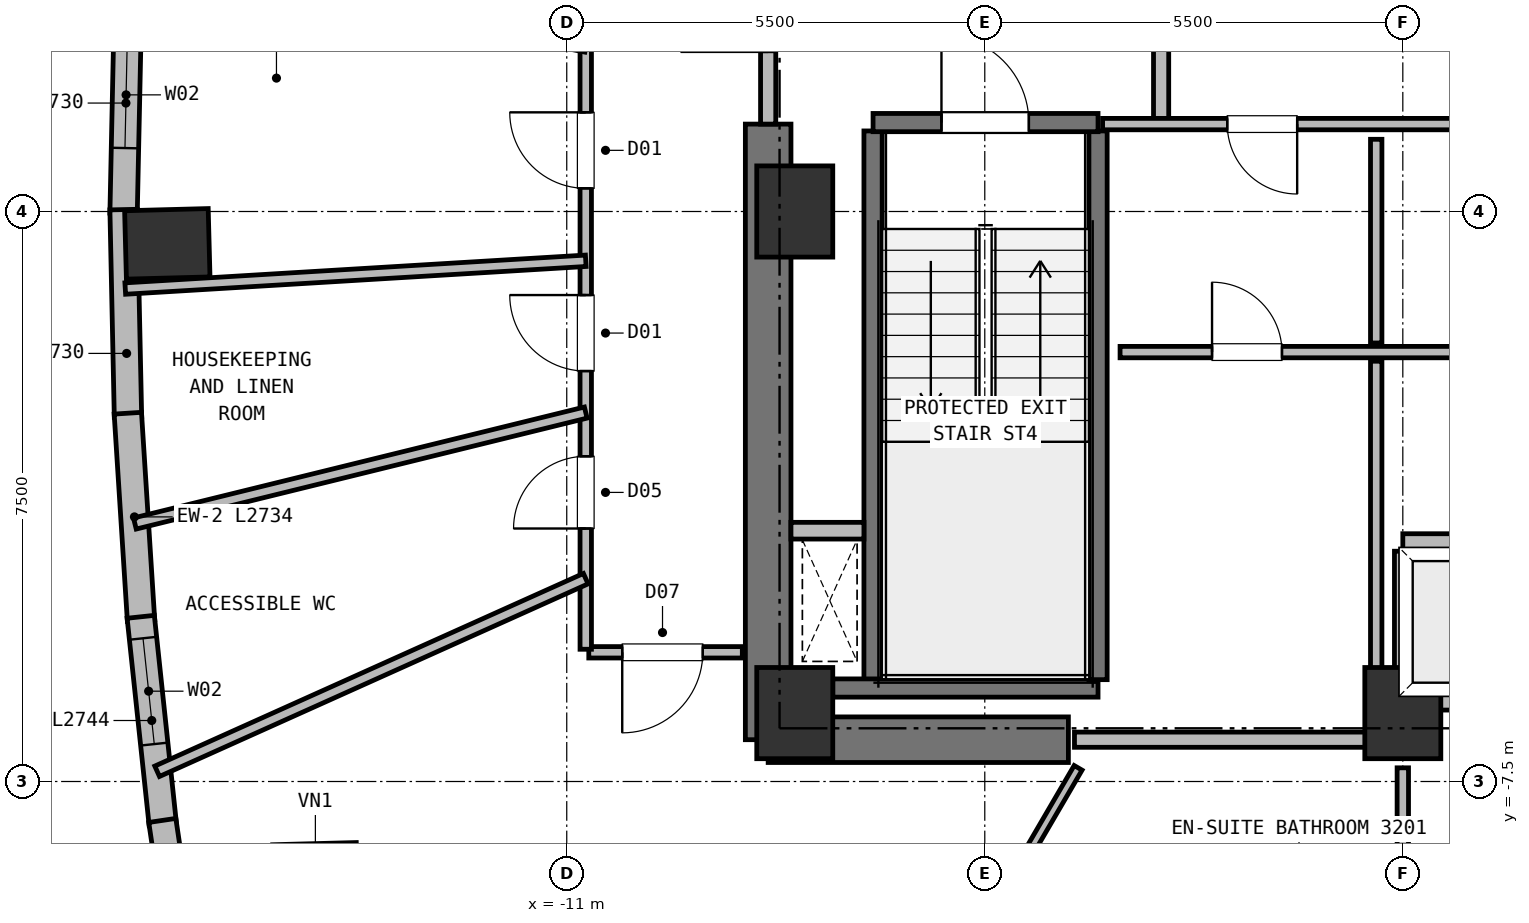
"""IFC4 building model, lengths in metres.
Left out: names, types, materials, properties, quantities, classifications, styles, units other than length and angle.
Written with IfcOpenShell. Run it as: python <this file> out.ifc"""

import sys

from ifc_helpers import new_model, si_unit, direction, frame, frame_2d, origin, origin_2d, place, context, subcontext, project, spatial, rectangle, extrude, element, fill, save


model = new_model("IFC4")
c1 = context("Model", 3, precision=1e-05, world=origin(), true_north=direction((0.0, 1.0)))
c2 = subcontext(c1, "Body", "Model", "MODEL_VIEW")
j1 = project(units=[si_unit("LENGTHUNIT", "METRE"), si_unit("PLANEANGLEUNIT", "RADIAN")], contexts=[c1])
p1 = place(None, origin())
s1 = spatial("IfcSite", under=j1, at=p1, CompositionType="ELEMENT")
p2 = place(p1, origin())
s2 = spatial("IfcBuilding", under=s1, at=p2, CompositionType="ELEMENT")
p3 = place(p2, frame((0.0, 0.0, 119.75)))
s3 = spatial("IfcBuildingStorey", under=s2, at=p3, CompositionType="ELEMENT", Elevation=119.75)
for number, where, z_axis, x_axis in (
    (1, (-8.0, -6.6, 0.0), (0.0, 0.0, 1.0), (1.0, 0.0, 0.0)),
    (2, (0.0, -6.6, 0.0), (0.0, 0.0, 1.0), (1.0, 0.0, 0.0)),
    (3, (-8.0, 0.0, 0.0), (0.0, 0.0, 1.0), (1.0, 0.0, 0.0)),
):
    element("IfcColumn", number, at=place(p3, frame(where, z_axis=z_axis, x_axis=x_axis)), inside=s3, PredefinedType="COLUMN", context=c2, shape_type="SweptSolid", body=[
        extrude(rectangle(XDim=1.0, YDim=1.2, at=origin_2d()), origin(), (0.0, 0.0, 1.0), 3.75),
    ])
p4 = place(p3, frame((-8.35, -6.95, 0.0), z_axis=(0.0, 0.0, 1.0), x_axis=(1.0, 0.0, 0.0)))
e4 = element("IfcWall", 4, at=p4, inside=s3, PredefinedType="SHEAR", context=c2, shape_type="SweptSolid", body=[
    extrude(rectangle(XDim=3.95, YDim=0.6, at=frame_2d((1.975, 0.0))), origin(), (0.0, 0.0, 1.0), 3.5),
])
p5 = place(p3, frame((-8.35, -6.95, 0.0), z_axis=(0.0, 0.0, 1.0), x_axis=(0.0, 1.0, 0.0)))
e5 = element("IfcWall", 5, at=p5, inside=s3, PredefinedType="SHEAR", context=c2, shape_type="SweptSolid", body=[
    extrude(rectangle(XDim=8.1, YDim=0.6, at=frame_2d((4.05, 0.0))), origin(), (0.0, 0.0, 1.0), 3.5),
])
for number, where, z_axis, x_axis in (
    (6, (-16.255, -0.426, 0.0), (0.0, 0.0, 1.0), (-0.026, 1.0, 0.0)),
    (7, (-14.307, -8.768, 0.0), (0.0, 0.0, 1.0), (-0.026, 1.0, 0.0)),
):
    element("IfcColumn", number, at=place(p3, frame(where, z_axis=z_axis, x_axis=x_axis)), inside=s3, PredefinedType="COLUMN", context=c2, shape_type="SweptSolid", body=[
        extrude(rectangle(XDim=0.9, YDim=1.1, at=origin_2d()), origin(), (0.0, 0.0, 1.0), 3.75),
    ])
p6 = place(p3, frame((-16.831, -0.025, 0.0), z_axis=(0.0, 0.0, 1.0), x_axis=(0.021286998628, 0.999773406172, 0.0)))
e8 = element("IfcWall", 8, at=p6, inside=s3, PredefinedType="SOLIDWALL", context=c2, shape_type="SweptSolid", body=[
    extrude(rectangle(XDim=2.73, YDim=0.36, at=frame_2d((1.365, 0.0))), origin(), (0.0, 0.0, 1.0), 3.5),
])
p7 = place(p6, frame((0.86, 0.0, 0.72)))
e9 = element("IfcOpeningElement", 9, at=p7, cuts=e8, PredefinedType="OPENING", context=c2, shape_type="SweptSolid", body=[
    extrude(rectangle(XDim=1.4, YDim=1.84, at=frame_2d((0.7, 0.92))), frame((0.0, 0.19, 0.0), z_axis=(0.0, -1.0, 0.0), x_axis=(1.0, 0.0, 0.0)), (0.0, 0.0, 1.0), 0.38),
])
p8 = place(p3, frame((-16.773, -2.704, 0.0), z_axis=(0.0, 0.0, 1.0), x_axis=(-0.021286998628, 0.999773406172, 0.0)))
e10 = element("IfcWall", 10, at=p8, inside=s3, PredefinedType="SOLIDWALL", context=c2, shape_type="SweptSolid", body=[
    extrude(rectangle(XDim=2.73, YDim=0.36, at=frame_2d((1.365, 0.0))), origin(), (0.0, 0.0, 1.0), 3.5),
])
p9 = place(p3, frame((-16.601, -5.383, 0.0), z_axis=(0.0, 0.0, 1.0), x_axis=(-0.063662313476, 0.99797149751, 0.0)))
e11 = element("IfcWall", 11, at=p9, inside=s3, PredefinedType="SOLIDWALL", context=c2, shape_type="SweptSolid", body=[
    extrude(rectangle(XDim=2.734, YDim=0.36, at=frame_2d((1.367, 0.0))), origin(), (0.0, 0.0, 1.0), 3.5),
])
p10 = place(p3, frame((-16.315, -8.062, 0.0), z_axis=(0.0, 0.0, 1.0), x_axis=(-0.105606362296, 0.994408012962, 0.0)))
e12 = element("IfcWall", 12, at=p10, inside=s3, PredefinedType="SOLIDWALL", context=c2, shape_type="SweptSolid", body=[
    extrude(rectangle(XDim=2.744, YDim=0.36, at=frame_2d((1.372, 0.0))), origin(), (0.0, 0.0, 1.0), 3.5),
])
p11 = place(p10, frame((1.06, 0.0, 0.72)))
e13 = element("IfcOpeningElement", 13, at=p11, cuts=e12, PredefinedType="OPENING", context=c2, shape_type="SweptSolid", body=[
    extrude(rectangle(XDim=1.4, YDim=1.84, at=frame_2d((0.7, 0.92))), frame((0.0, 0.19, 0.0), z_axis=(0.0, -1.0, 0.0), x_axis=(1.0, 0.0, 0.0)), (0.0, 0.0, 1.0), 0.38),
])
p12 = place(p3, frame((-15.915, -10.74, 0.0), z_axis=(0.0, 0.0, 1.0), x_axis=(-0.147193392227, 0.98910773189, 0.0)))
e14 = element("IfcWall", 14, at=p12, inside=s3, PredefinedType="SOLIDWALL", context=c2, shape_type="SweptSolid", body=[
    extrude(rectangle(XDim=2.758, YDim=0.36, at=frame_2d((1.379, 0.0))), origin(), (0.0, 0.0, 1.0), 3.5),
])
p13 = place(p12, frame((0.579, 0.0, 0.72)))
e15 = element("IfcOpeningElement", 15, at=p13, cuts=e14, PredefinedType="OPENING", context=c2, shape_type="SweptSolid", body=[
    extrude(rectangle(XDim=1.6, YDim=1.88, at=frame_2d((0.8, 0.94))), frame((0.0, 0.19, 0.0), z_axis=(0.0, -1.0, 0.0), x_axis=(1.0, 0.0, 0.0)), (0.0, 0.0, 1.0), 0.38),
])
p14 = place(p3, frame((-6.97, -6.16, 0.0), z_axis=(0.0, 0.0, 1.0), x_axis=(0.0, 1.0, 0.0)))
e16 = element("IfcWall", 16, at=p14, inside=s3, PredefinedType="SHEAR", context=c2, shape_type="SweptSolid", body=[
    extrude(rectangle(XDim=7.22, YDim=0.24, at=frame_2d((3.61, 0.0))), origin(), (0.0, 0.0, 1.0), 3.5),
])
p15 = place(p3, frame((-7.5, -6.27, 0.0), z_axis=(0.0, 0.0, 1.0), x_axis=(1.0, 0.0, 0.0)))
e17 = element("IfcWall", 17, at=p15, inside=s3, PredefinedType="SHEAR", context=c2, shape_type="SweptSolid", body=[
    extrude(rectangle(XDim=3.49, YDim=0.24, at=frame_2d((1.745, 0.0))), origin(), (0.0, 0.0, 1.0), 3.5),
])
p16 = place(p3, frame((-4.01, -6.16, 0.0), z_axis=(0.0, 0.0, 1.0), x_axis=(0.0, 1.0, 0.0)))
e18 = element("IfcWall", 18, at=p16, inside=s3, PredefinedType="SHEAR", context=c2, shape_type="SweptSolid", body=[
    extrude(rectangle(XDim=7.22, YDim=0.24, at=frame_2d((3.61, 0.0))), origin(), (0.0, 0.0, 1.0), 3.5),
])
p17 = place(p3, frame((-6.97, 1.17, 0.0), z_axis=(0.0, 0.0, 1.0), x_axis=(1.0, 0.0, 0.0)))
e19 = element("IfcWall", 19, at=p17, inside=s3, PredefinedType="SHEAR", context=c2, shape_type="SweptSolid", body=[
    extrude(rectangle(XDim=2.96, YDim=0.24, at=frame_2d((1.48, 0.0))), origin(), (0.0, 0.0, 1.0), 3.5),
])
p18 = place(p17, frame((0.9, 0.0, 0.0)))
e20 = element("IfcOpeningElement", 20, at=p18, cuts=e19, PredefinedType="OPENING", context=c2, shape_type="SweptSolid", body=[
    extrude(rectangle(XDim=1.15, YDim=2.15, at=frame_2d((0.575, 1.075))), frame((0.0, 0.13, 0.0), z_axis=(0.0, -1.0, 0.0), x_axis=(1.0, 0.0, 0.0)), (0.0, 0.0, 1.0), 0.26),
])
p19 = place(p3, frame((-8.05, -4.2, 0.0), z_axis=(0.0, 0.0, 1.0), x_axis=(1.0, 0.0, 0.0)))
e21 = element("IfcWall", 21, at=p19, inside=s3, PredefinedType="PARTITIONING", context=c2, shape_type="SweptSolid", body=[
    extrude(rectangle(XDim=0.96, YDim=0.22, at=frame_2d((0.48, 0.0))), origin(), (0.0, 0.0, 1.0), 3.5),
])
p20 = place(p3, frame((0.0, -6.45, 0.0), z_axis=(0.0, 0.0, 1.0), x_axis=(1.0, 0.0, 0.0)))
e22 = element("IfcWall", 22, at=p20, inside=s3, PredefinedType="PARTITIONING", context=c2, shape_type="SweptSolid", body=[
    extrude(rectangle(XDim=1.86, YDim=0.22, at=frame_2d((0.93, 0.0))), origin(), (0.0, 0.0, 1.0), 3.12),
])
p21 = place(p20, frame((0.64, 0.0, 0.0)))
e23 = element("IfcOpeningElement", 23, at=p21, cuts=e22, PredefinedType="OPENING", context=c2, shape_type="SweptSolid", body=[
    extrude(rectangle(XDim=1.08, YDim=2.15, at=frame_2d((0.54, 1.075))), frame((0.0, 0.12, 0.0), z_axis=(0.0, -1.0, 0.0), x_axis=(1.0, 0.0, 0.0)), (0.0, 0.0, 1.0), 0.24),
])
for number, where, z_axis, x_axis in (
    (24, (0.0, -4.35, 0.0), (0.0, 0.0, 1.0), (1.0, 0.0, 0.0)),
    (25, (0.0, -6.33, 0.0), (0.0, 0.0, 1.0), (0.0, 1.0, 0.0)),
):
    element("IfcWall", number, at=place(p3, frame(where, z_axis=z_axis, x_axis=x_axis)), inside=s3, PredefinedType="PARTITIONING", context=c2, shape_type="SweptSolid", body=[
        extrude(rectangle(XDim=1.86, YDim=0.22, at=frame_2d((0.93, 0.0))), origin(), (0.0, 0.0, 1.0), 3.5),
    ])
p22 = place(p3, frame((-3.18, 1.15, 0.0), z_axis=(0.0, 0.0, 1.0), x_axis=(0.0, 1.0, 0.0)))
e26 = element("IfcWall", 26, at=p22, inside=s3, PredefinedType="PARTITIONING", context=c2, shape_type="SweptSolid", body=[
    extrude(rectangle(XDim=3.3, YDim=0.2, at=frame_2d((1.65, 0.0))), origin(), (0.0, 0.0, 1.0), 3.5),
])
p23 = place(p22, frame((1.08, 0.0, 0.0)))
e27 = element("IfcOpeningElement", 27, at=p23, cuts=e26, PredefinedType="OPENING", context=c2, shape_type="SweptSolid", body=[
    extrude(rectangle(XDim=1.15, YDim=2.15, at=frame_2d((0.575, 1.075))), frame((0.0, 0.11, 0.0), z_axis=(0.0, -1.0, 0.0), x_axis=(1.0, 0.0, 0.0)), (0.0, 0.0, 1.0), 0.22),
])
p24 = place(p3, frame((-8.35, 1.15, 0.0), z_axis=(0.0, 0.0, 1.0), x_axis=(0.0, 1.0, 0.0)))
e28 = element("IfcWall", 28, at=p24, inside=s3, PredefinedType="PARTITIONING", context=c2, shape_type="SweptSolid", body=[
    extrude(rectangle(XDim=5.4, YDim=0.2, at=frame_2d((2.7, 0.0))), origin(), (0.0, 0.0, 1.0), 3.5),
])
p25 = place(p24, frame((0.95, 0.0, 0.0)))
e29 = element("IfcOpeningElement", 29, at=p25, cuts=e28, PredefinedType="OPENING", context=c2, shape_type="SweptSolid", body=[
    extrude(rectangle(XDim=1.15, YDim=2.15, at=frame_2d((0.575, 1.075))), frame((0.0, 0.11, 0.0), z_axis=(0.0, -1.0, 0.0), x_axis=(1.0, 0.0, 0.0)), (0.0, 0.0, 1.0), 0.22),
])
p26 = place(p3, frame((3.95, 1.15, 0.0), z_axis=(0.0, 0.0, 1.0), x_axis=(-1.0, 0.0, 0.0)))
e30 = element("IfcWall", 30, at=p26, inside=s3, PredefinedType="PARTITIONING", context=c2, shape_type="SweptSolid", body=[
    extrude(rectangle(XDim=7.9, YDim=0.15, at=frame_2d((3.95, 0.0))), origin(), (0.0, 0.0, 1.0), 3.5),
])
p27 = place(p26, frame((5.34, 0.0, 0.0)))
e31 = element("IfcOpeningElement", 31, at=p27, cuts=e30, PredefinedType="OPENING", context=c2, shape_type="SweptSolid", body=[
    extrude(rectangle(XDim=0.92, YDim=2.05, at=frame_2d((0.46, 1.025))), frame((0.0, 0.085, 0.0), z_axis=(0.0, -1.0, 0.0), x_axis=(1.0, 0.0, 0.0)), (0.0, 0.0, 1.0), 0.17),
])
p28 = place(p26, frame((1.84, 0.0, 0.0)))
e32 = element("IfcOpeningElement", 32, at=p28, cuts=e30, PredefinedType="OPENING", context=c2, shape_type="SweptSolid", body=[
    extrude(rectangle(XDim=0.92, YDim=2.05, at=frame_2d((0.46, 1.025))), frame((0.0, 0.085, 0.0), z_axis=(0.0, -1.0, 0.0), x_axis=(1.0, 0.0, 0.0)), (0.0, 0.0, 1.0), 0.17),
])
p29 = place(p3, frame((-4.32, -6.95, 0.0), z_axis=(0.0, 0.0, 1.0), x_axis=(1.0, 0.0, 0.0)))
e33 = element("IfcWall", 33, at=p29, inside=s3, PredefinedType="PARTITIONING", context=c2, shape_type="SweptSolid", body=[
    extrude(rectangle(XDim=4.32, YDim=0.2, at=frame_2d((2.16, 0.0))), origin(), (0.0, 0.0, 1.0), 3.5),
])
p30 = place(p3, frame((-3.72, -1.85, 0.0), z_axis=(0.0, 0.0, 1.0), x_axis=(1.0, 0.0, 0.0)))
e34 = element("IfcWall", 34, at=p30, inside=s3, PredefinedType="PARTITIONING", context=c2, shape_type="SweptSolid", body=[
    extrude(rectangle(XDim=7.44, YDim=0.15, at=frame_2d((3.72, 0.0))), origin(), (0.0, 0.0, 1.0), 3.5),
])
p31 = place(p30, frame((1.21, 0.0, 0.0)))
e35 = element("IfcOpeningElement", 35, at=p31, cuts=e34, PredefinedType="OPENING", context=c2, shape_type="SweptSolid", body=[
    extrude(rectangle(XDim=0.92, YDim=2.05, at=frame_2d((0.46, 1.025))), frame((0.0, 0.085, 0.0), z_axis=(0.0, -1.0, 0.0), x_axis=(1.0, 0.0, 0.0)), (0.0, 0.0, 1.0), 0.17),
])
p32 = place(p30, frame((4.91, 0.0, 0.0)))
e36 = element("IfcOpeningElement", 36, at=p32, cuts=e34, PredefinedType="OPENING", context=c2, shape_type="SweptSolid", body=[
    extrude(rectangle(XDim=0.92, YDim=2.05, at=frame_2d((0.46, 1.025))), frame((0.0, 0.085, 0.0), z_axis=(0.0, -1.0, 0.0), x_axis=(1.0, 0.0, 0.0)), (0.0, 0.0, 1.0), 0.17),
])
p33 = place(p3, frame((-0.35, -6.58, 0.0), z_axis=(0.0, 0.0, 1.0), x_axis=(0.0, 1.0, 0.0)))
e37 = element("IfcWall", 37, at=p33, inside=s3, PredefinedType="PARTITIONING", context=c2, shape_type="SweptSolid", body=[
    extrude(rectangle(XDim=4.61, YDim=0.15, at=frame_2d((2.305, 0.0))), origin(), (0.0, 0.0, 1.0), 3.5),
])
p34 = place(p3, frame((-0.35, -1.73, 0.0), z_axis=(0.0, 0.0, 1.0), x_axis=(0.0, 1.0, 0.0)))
e38 = element("IfcWall", 38, at=p34, inside=s3, PredefinedType="PARTITIONING", context=c2, shape_type="SweptSolid", body=[
    extrude(rectangle(XDim=2.68, YDim=0.15, at=frame_2d((1.34, 0.0))), origin(), (0.0, 0.0, 1.0), 3.5),
])
p35 = place(p3, frame((-8.69, -5.8, 0.0), z_axis=(0.0, 0.0, 1.0), x_axis=(-1.0, 0.0, 0.0)))
e39 = element("IfcWall", 39, at=p35, inside=s3, PredefinedType="PARTITIONING", context=c2, shape_type="SweptSolid", body=[
    extrude(rectangle(XDim=2.02, YDim=0.15, at=frame_2d((1.01, 0.0))), origin(), (0.0, 0.0, 1.0), 3.5),
])
p36 = place(p35, frame((0.52, 0.0, 0.0)))
e40 = element("IfcOpeningElement", 40, at=p36, cuts=e39, PredefinedType="OPENING", context=c2, shape_type="SweptSolid", body=[
    extrude(rectangle(XDim=1.06, YDim=2.15, at=frame_2d((0.53, 1.075))), frame((0.0, 0.085, 0.0), z_axis=(0.0, -1.0, 0.0), x_axis=(1.0, 0.0, 0.0)), (0.0, 0.0, 1.0), 0.17),
])
p37 = place(p3, frame((-10.75, -5.76, 0.0), z_axis=(0.0, 0.0, 1.0), x_axis=(0.0, 1.0, 0.0)))
e41 = element("IfcWall", 41, at=p37, inside=s3, PredefinedType="PARTITIONING", context=c2, shape_type="SweptSolid", body=[
    extrude(rectangle(XDim=12.92, YDim=0.15, at=frame_2d((6.46, 0.0))), origin(), (0.0, 0.0, 1.0), 3.5),
])
p38 = place(p37, frame((3.66, 0.0, 0.0)))
e42 = element("IfcOpeningElement", 42, at=p38, cuts=e41, PredefinedType="OPENING", context=c2, shape_type="SweptSolid", body=[
    extrude(rectangle(XDim=1.0, YDim=2.15, at=frame_2d((0.5, 1.075))), frame((0.0, 0.085, 0.0), z_axis=(0.0, -1.0, 0.0), x_axis=(1.0, 0.0, 0.0)), (0.0, 0.0, 1.0), 0.17),
])
p39 = place(p37, frame((1.589, 0.0, 0.0)))
e43 = element("IfcOpeningElement", 43, at=p39, cuts=e41, PredefinedType="OPENING", context=c2, shape_type="SweptSolid", body=[
    extrude(rectangle(XDim=0.95, YDim=2.1, at=frame_2d((0.475, 1.05))), frame((0.0, 0.085, 0.0), z_axis=(0.0, -1.0, 0.0), x_axis=(1.0, 0.0, 0.0)), (0.0, 0.0, 1.0), 0.17),
])
p40 = place(p37, frame((11.278, 0.0, 0.0)))
e44 = element("IfcOpeningElement", 44, at=p40, cuts=e41, PredefinedType="OPENING", context=c2, shape_type="SweptSolid", body=[
    extrude(rectangle(XDim=1.0, YDim=2.15, at=frame_2d((0.5, 1.075))), frame((0.0, 0.085, 0.0), z_axis=(0.0, -1.0, 0.0), x_axis=(1.0, 0.0, 0.0)), (0.0, 0.0, 1.0), 0.17),
])
p41 = place(p37, frame((6.065, 0.0, 0.0)))
e45 = element("IfcOpeningElement", 45, at=p41, cuts=e41, PredefinedType="OPENING", context=c2, shape_type="SweptSolid", body=[
    extrude(rectangle(XDim=1.0, YDim=2.15, at=frame_2d((0.5, 1.075))), frame((0.0, 0.085, 0.0), z_axis=(0.0, -1.0, 0.0), x_axis=(1.0, 0.0, 0.0)), (0.0, 0.0, 1.0), 0.17),
])
p42 = place(p3, frame((-10.75, -4.831, 0.0), z_axis=(0.0, 0.0, 1.0), x_axis=(-0.91212311918, -0.409916351781, 0.0)))
e46 = element("IfcWall", 46, at=p42, inside=s3, PredefinedType="PARTITIONING", context=c2, shape_type="SweptSolid", body=[
    extrude(rectangle(XDim=6.182, YDim=0.15, at=frame_2d((3.091, 0.0))), origin(), (0.0, 0.0, 1.0), 3.5),
])
p43 = place(p3, frame((-5.661, -9.7, 0.0), z_axis=(0.0, 0.0, 1.0), x_axis=(0.50404729756, 0.863676051435, 0.0)))
e47 = element("IfcWall", 47, at=p43, inside=s3, PredefinedType="PARTITIONING", context=c2, shape_type="SweptSolid", body=[
    extrude(rectangle(XDim=2.756, YDim=0.12, at=frame_2d((1.378, 0.0))), origin(), (0.0, 0.0, 1.0), 3.5),
])
p44 = place(p3, frame((0.0, -7.32, 0.0), z_axis=(0.0, 0.0, 1.0), x_axis=(0.0, -1.0, 0.0)))
e48 = element("IfcWall", 48, at=p44, inside=s3, PredefinedType="PARTITIONING", context=c2, shape_type="SweptSolid", body=[
    extrude(rectangle(XDim=11.303, YDim=0.15, at=frame_2d((5.651, 0.0))), origin(), (0.0, 0.0, 1.0), 3.5),
])
p45 = place(p3, frame((-10.75, 2.156, 0.0), z_axis=(0.0, 0.0, 1.0), x_axis=(-0.980467777356, 0.196679784337, 0.0)))
e49 = element("IfcWall", 49, at=p45, inside=s3, PredefinedType="PARTITIONING", context=c2, shape_type="SweptSolid", body=[
    extrude(rectangle(XDim=2.499, YDim=0.12, at=frame_2d((1.25, 0.0))), origin(), (0.0, 0.0, 1.0), 3.5),
])
p46 = place(p3, frame((-10.75, -0.648, 0.0), z_axis=(0.0, 0.0, 1.0), x_axis=(-0.998185459259, -0.060214524199, 0.0)))
e50 = element("IfcWall", 50, at=p46, inside=s3, PredefinedType="PARTITIONING", context=c2, shape_type="SweptSolid", body=[
    extrude(rectangle(XDim=6.07, YDim=0.15, at=frame_2d((3.035, 0.0))), origin(), (0.0, 0.0, 1.0), 3.5),
])
p47 = place(p3, frame((-10.75, -2.646, 0.0), z_axis=(0.0, 0.0, 1.0), x_axis=(-0.97101530701, -0.239017308059, 0.0)))
e51 = element("IfcWall", 51, at=p47, inside=s3, PredefinedType="PARTITIONING", context=c2, shape_type="SweptSolid", body=[
    extrude(rectangle(XDim=6.109, YDim=0.15, at=frame_2d((3.055, 0.0))), origin(), (0.0, 0.0, 1.0), 3.5),
])
p48 = place(p7, origin())
e52 = element("IfcWindow", 52, at=p48, inside=s3, PartitioningType="SINGLE_PANEL", PredefinedType="WINDOW", context=c2, shape_type="SweptSolid", body=[
    extrude(rectangle(XDim=1.4, YDim=1.84, at=frame_2d((0.7, 0.92))), frame((0.0, 0.03, 0.0), z_axis=(0.0, -1.0, 0.0), x_axis=(1.0, 0.0, 0.0)), (0.0, 0.0, 1.0), 0.06),
])
fill(e9, e52)
p49 = place(p11, origin())
e53 = element("IfcWindow", 53, at=p49, inside=s3, PartitioningType="SINGLE_PANEL", PredefinedType="WINDOW", context=c2, shape_type="SweptSolid", body=[
    extrude(rectangle(XDim=1.4, YDim=1.84, at=frame_2d((0.7, 0.92))), frame((0.0, 0.03, 0.0), z_axis=(0.0, -1.0, 0.0), x_axis=(1.0, 0.0, 0.0)), (0.0, 0.0, 1.0), 0.06),
])
fill(e13, e53)
p50 = place(p18, origin())
e54 = element("IfcDoor", 54, at=p50, inside=s3, OperationType="SINGLE_SWING_LEFT", PredefinedType="DOOR", context=c2, shape_type="SweptSolid", body=[
    extrude(rectangle(XDim=1.15, YDim=2.15, at=frame_2d((0.575, 1.075))), frame((0.0, 0.025, 0.0), z_axis=(0.0, -1.0, 0.0), x_axis=(1.0, 0.0, 0.0)), (0.0, 0.0, 1.0), 0.05),
])
fill(e20, e54)
p51 = place(p25, origin())
e55 = element("IfcDoor", 55, at=p51, inside=s3, OperationType="SINGLE_SWING_LEFT", PredefinedType="DOOR", context=c2, shape_type="SweptSolid", body=[
    extrude(rectangle(XDim=1.15, YDim=2.15, at=frame_2d((0.575, 1.075))), frame((0.0, 0.025, 0.0), z_axis=(0.0, -1.0, 0.0), x_axis=(1.0, 0.0, 0.0)), (0.0, 0.0, 1.0), 0.05),
])
fill(e29, e55)
p52 = place(p27, origin())
e56 = element("IfcDoor", 56, at=p52, inside=s3, OperationType="SINGLE_SWING_LEFT", PredefinedType="DOOR", context=c2, shape_type="SweptSolid", body=[
    extrude(rectangle(XDim=0.92, YDim=2.05, at=frame_2d((0.46, 1.025))), frame((0.0, 0.025, 0.0), z_axis=(0.0, -1.0, 0.0), x_axis=(1.0, 0.0, 0.0)), (0.0, 0.0, 1.0), 0.05),
])
fill(e31, e56)
p53 = place(p31, origin())
e57 = element("IfcDoor", 57, at=p53, inside=s3, OperationType="SINGLE_SWING_LEFT", PredefinedType="DOOR", context=c2, shape_type="SweptSolid", body=[
    extrude(rectangle(XDim=0.92, YDim=2.05, at=frame_2d((0.46, 1.025))), frame((0.0, 0.025, 0.0), z_axis=(0.0, -1.0, 0.0), x_axis=(1.0, 0.0, 0.0)), (0.0, 0.0, 1.0), 0.05),
])
fill(e35, e57)
p54 = place(p38, origin())
e58 = element("IfcDoor", 58, at=p54, inside=s3, OperationType="SINGLE_SWING_RIGHT", PredefinedType="DOOR", context=c2, shape_type="SweptSolid", body=[
    extrude(rectangle(XDim=1.0, YDim=2.15, at=frame_2d((0.5, 1.075))), frame((0.0, 0.025, 0.0), z_axis=(0.0, -1.0, 0.0), x_axis=(1.0, 0.0, 0.0)), (0.0, 0.0, 1.0), 0.05),
])
fill(e42, e58)
p55 = place(p39, origin())
e59 = element("IfcDoor", 59, at=p55, inside=s3, OperationType="SINGLE_SWING_LEFT", PredefinedType="DOOR", context=c2, shape_type="SweptSolid", body=[
    extrude(rectangle(XDim=0.95, YDim=2.1, at=frame_2d((0.475, 1.05))), frame((0.0, 0.025, 0.0), z_axis=(0.0, -1.0, 0.0), x_axis=(1.0, 0.0, 0.0)), (0.0, 0.0, 1.0), 0.05),
])
fill(e43, e59)
p56 = place(p41, origin())
e60 = element("IfcDoor", 60, at=p56, inside=s3, OperationType="SINGLE_SWING_RIGHT", PredefinedType="DOOR", context=c2, shape_type="SweptSolid", body=[
    extrude(rectangle(XDim=1.0, YDim=2.15, at=frame_2d((0.5, 1.075))), frame((0.0, 0.025, 0.0), z_axis=(0.0, -1.0, 0.0), x_axis=(1.0, 0.0, 0.0)), (0.0, 0.0, 1.0), 0.05),
])
fill(e45, e60)
p57 = place(p36, origin())
e61 = element("IfcDoor", 61, at=p57, inside=s3, OperationType="SINGLE_SWING_RIGHT", PredefinedType="DOOR", context=c2, shape_type="SweptSolid", body=[
    extrude(rectangle(XDim=1.06, YDim=2.15, at=frame_2d((0.53, 1.075))), frame((0.0, 0.025, 0.0), z_axis=(0.0, -1.0, 0.0), x_axis=(1.0, 0.0, 0.0)), (0.0, 0.0, 1.0), 0.05),
])
fill(e40, e61)
save(model, sys.argv[1])
